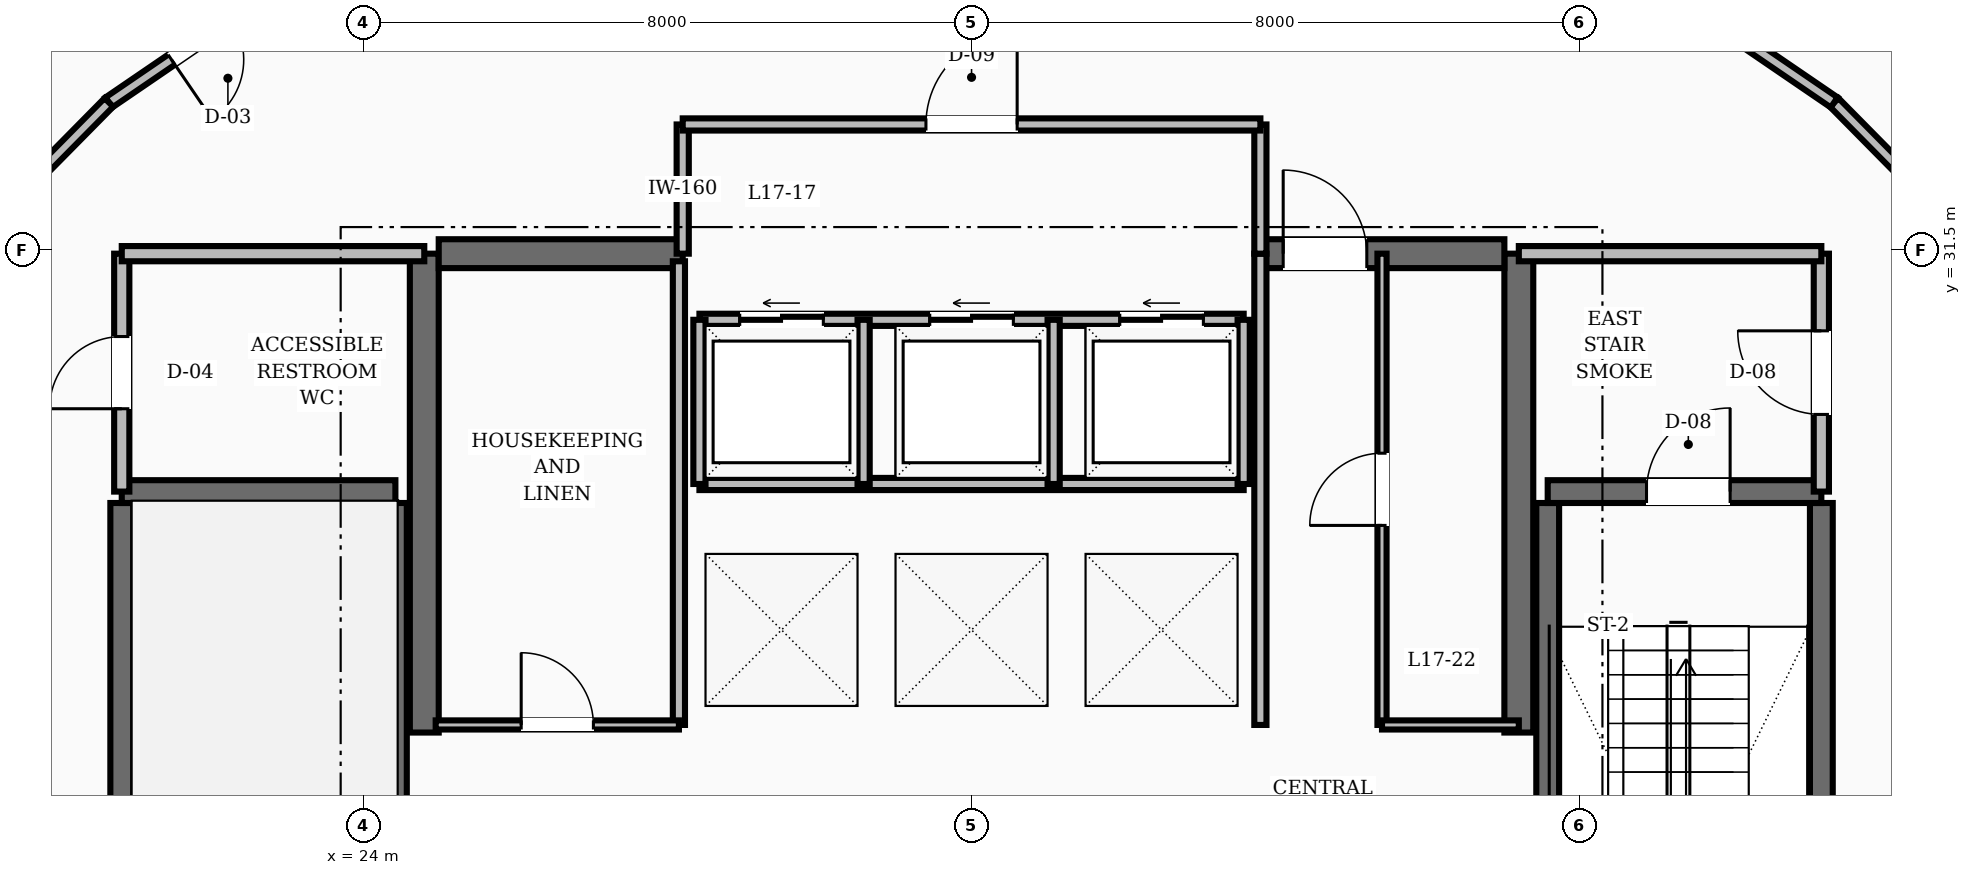
"""IFC4 building model, lengths in metres.
Left out: names, types, materials, properties, quantities, classifications, styles, units other than length and angle.
Written with IfcOpenShell. Run it as: python <this file> out.ifc"""

import sys

from ifc_helpers import new_model, si_unit, direction, frame, frame_2d, origin, place, context, subcontext, project, spatial, rectangle, extrude, element, fill, save


model = new_model("IFC4")
c1 = context("Model", 3, precision=1e-05, world=origin(), true_north=direction((0.0, 1.0)))
c2 = subcontext(c1, "Body", "Model", "MODEL_VIEW")
j1 = project(units=[si_unit("LENGTHUNIT", "METRE"), si_unit("PLANEANGLEUNIT", "RADIAN")], contexts=[c1])
p1 = place(None, origin())
s1 = spatial("IfcSite", under=j1, at=p1, CompositionType="ELEMENT")
p2 = place(p1, origin())
s2 = spatial("IfcBuilding", under=s1, at=p2, CompositionType="ELEMENT")
p3 = place(p2, frame((0.0, 0.0, 70.0)))
s3 = spatial("IfcBuildingStorey", under=s2, at=p3, CompositionType="ELEMENT", Elevation=70.0)
for number, where, z_axis, x_axis in (
    (1, (24.8, 25.15, 0.0), (0.0, 0.0, 1.0), (0.0, 1.0, 0.0)),
    (2, (39.2, 25.15, 0.0), (0.0, 0.0, 1.0), (0.0, 1.0, 0.0)),
):
    element("IfcWall", number, at=place(p3, frame(where, z_axis=z_axis, x_axis=x_axis)), inside=s3, PredefinedType="SHEAR", context=c2, shape_type="SweptSolid", body=[
        extrude(rectangle(XDim=6.3, YDim=0.38, at=frame_2d((3.15, 0.0))), origin(), (0.0, 0.0, 1.0), 3.6),
    ])
p4 = place(p3, frame((24.99, 31.45, 0.0), z_axis=(0.0, 0.0, 1.0), x_axis=(1.0, 0.0, 0.0)))
e3 = element("IfcWall", 3, at=p4, inside=s3, PredefinedType="SHEAR", context=c2, shape_type="SweptSolid", body=[
    extrude(rectangle(XDim=3.21, YDim=0.38, at=frame_2d((1.605, 0.0))), origin(), (0.0, 0.0, 1.0), 3.6),
])
p5 = place(p3, frame((35.8, 31.45, 0.0), z_axis=(0.0, 0.0, 1.0), x_axis=(1.0, 0.0, 0.0)))
e4 = element("IfcWall", 4, at=p5, inside=s3, PredefinedType="SHEAR", context=c2, shape_type="SweptSolid", body=[
    extrude(rectangle(XDim=3.21, YDim=0.38, at=frame_2d((1.605, 0.0))), origin(), (0.0, 0.0, 1.0), 3.6),
])
p6 = place(p5, frame((0.3, 0.0, 0.0)))
e5 = element("IfcOpeningElement", 5, at=p6, cuts=e4, PredefinedType="OPENING", context=c2, shape_type="SweptSolid", body=[
    extrude(rectangle(XDim=1.1, YDim=2.1, at=frame_2d((0.55, 1.05))), frame((0.0, 0.2, 0.0), z_axis=(0.0, -1.0, 0.0), x_axis=(1.0, 0.0, 0.0)), (0.0, 0.0, 1.0), 0.4),
])
for number, where, z_axis, x_axis in (
    (6, (20.82, 19.43, 0.0), (0.0, 0.0, 1.0), (0.0, 1.0, 0.0)),
    (7, (24.42, 19.43, 0.0), (0.0, 0.0, 1.0), (0.0, 1.0, 0.0)),
):
    element("IfcWall", number, at=place(p3, frame(where, z_axis=z_axis, x_axis=x_axis)), inside=s3, PredefinedType="SHEAR", context=c2, shape_type="SweptSolid", body=[
        extrude(rectangle(XDim=8.74, YDim=0.3, at=frame_2d((4.37, 0.0))), origin(), (0.0, 0.0, 1.0), 3.6),
    ])
p7 = place(p3, frame((20.82, 28.32, 0.0), z_axis=(0.0, 0.0, 1.0), x_axis=(1.0, 0.0, 0.0)))
e8 = element("IfcWall", 8, at=p7, inside=s3, PredefinedType="SHEAR", context=c2, shape_type="SweptSolid", body=[
    extrude(rectangle(XDim=3.6, YDim=0.3, at=frame_2d((1.8, 0.0))), origin(), (0.0, 0.0, 1.0), 3.6),
])
for number, where, z_axis, x_axis in (
    (9, (43.18, 19.43, 0.0), (0.0, 0.0, 1.0), (0.0, 1.0, 0.0)),
    (10, (39.58, 19.43, 0.0), (0.0, 0.0, 1.0), (0.0, 1.0, 0.0)),
):
    element("IfcWall", number, at=place(p3, frame(where, z_axis=z_axis, x_axis=x_axis)), inside=s3, PredefinedType="SHEAR", context=c2, shape_type="SweptSolid", body=[
        extrude(rectangle(XDim=8.74, YDim=0.3, at=frame_2d((4.37, 0.0))), origin(), (0.0, 0.0, 1.0), 3.6),
    ])
p8 = place(p3, frame((39.58, 28.32, 0.0), z_axis=(0.0, 0.0, 1.0), x_axis=(1.0, 0.0, 0.0)))
e11 = element("IfcWall", 11, at=p8, inside=s3, PredefinedType="SHEAR", context=c2, shape_type="SweptSolid", body=[
    extrude(rectangle(XDim=3.6, YDim=0.3, at=frame_2d((1.8, 0.0))), origin(), (0.0, 0.0, 1.0), 3.6),
])
p9 = place(p8, frame((1.3, 0.0, 0.0)))
e12 = element("IfcOpeningElement", 12, at=p9, cuts=e11, PredefinedType="OPENING", context=c2, shape_type="SweptSolid", body=[
    extrude(rectangle(XDim=1.1, YDim=2.1, at=frame_2d((0.55, 1.05))), frame((0.0, 0.16, 0.0), z_axis=(0.0, -1.0, 0.0), x_axis=(1.0, 0.0, 0.0)), (0.0, 0.0, 1.0), 0.32),
])
p10 = place(p3, frame((43.18, 28.32, 0.0), z_axis=(0.0, 0.0, 1.0), x_axis=(0.0, 1.0, 0.0)))
e13 = element("IfcWall", 13, at=p10, inside=s3, PredefinedType="SOLIDWALL", context=c2, shape_type="SweptSolid", body=[
    extrude(rectangle(XDim=3.13, YDim=0.2, at=frame_2d((1.565, 0.0))), origin(), (0.0, 0.0, 1.0), 2.71),
])
p11 = place(p10, frame((1.015, 0.0, 0.0)))
e14 = element("IfcOpeningElement", 14, at=p11, cuts=e13, PredefinedType="OPENING", context=c2, shape_type="SweptSolid", body=[
    extrude(rectangle(XDim=1.1, YDim=2.1, at=frame_2d((0.55, 1.05))), frame((0.0, 0.11, 0.0), z_axis=(0.0, -1.0, 0.0), x_axis=(1.0, 0.0, 0.0)), (0.0, 0.0, 1.0), 0.22),
])
p12 = place(p3, frame((39.2, 31.45, 0.0), z_axis=(0.0, 0.0, 1.0), x_axis=(1.0, 0.0, 0.0)))
e15 = element("IfcWall", 15, at=p12, inside=s3, PredefinedType="SOLIDWALL", context=c2, shape_type="SweptSolid", body=[
    extrude(rectangle(XDim=3.98, YDim=0.2, at=frame_2d((1.99, 0.0))), origin(), (0.0, 0.0, 1.0), 2.71),
])
p13 = place(p3, frame((20.82, 28.32, 0.0), z_axis=(0.0, 0.0, 1.0), x_axis=(0.0, 1.0, 0.0)))
e16 = element("IfcWall", 16, at=p13, inside=s3, PredefinedType="SOLIDWALL", context=c2, shape_type="SweptSolid", body=[
    extrude(rectangle(XDim=3.13, YDim=0.2, at=frame_2d((1.565, 0.0))), origin(), (0.0, 0.0, 1.0), 2.71),
])
p14 = place(p13, frame((1.09, 0.0, 0.0)))
e17 = element("IfcOpeningElement", 17, at=p14, cuts=e16, PredefinedType="OPENING", context=c2, shape_type="SweptSolid", body=[
    extrude(rectangle(XDim=0.95, YDim=2.1, at=frame_2d((0.475, 1.05))), frame((0.0, 0.11, 0.0), z_axis=(0.0, -1.0, 0.0), x_axis=(1.0, 0.0, 0.0)), (0.0, 0.0, 1.0), 0.22),
])
p15 = place(p3, frame((20.82, 31.45, 0.0), z_axis=(0.0, 0.0, 1.0), x_axis=(1.0, 0.0, 0.0)))
e18 = element("IfcWall", 18, at=p15, inside=s3, PredefinedType="SOLIDWALL", context=c2, shape_type="SweptSolid", body=[
    extrude(rectangle(XDim=3.98, YDim=0.2, at=frame_2d((1.99, 0.0))), origin(), (0.0, 0.0, 1.0), 2.71),
])
p16 = place(p3, frame((35.8, 25.25, 0.0), z_axis=(0.0, 0.0, 1.0), x_axis=(0.0, 1.0, 0.0)))
e19 = element("IfcWall", 19, at=p16, inside=s3, PredefinedType="SOLIDWALL", context=c2, shape_type="SweptSolid", body=[
    extrude(rectangle(XDim=6.2, YDim=0.16, at=frame_2d((3.1, 0.0))), origin(), (0.0, 0.0, 1.0), 2.71),
])
p17 = place(p3, frame((28.42, 30.58, 0.0), z_axis=(0.0, 0.0, 1.0), x_axis=(1.0, 0.0, 0.0)))
e20 = element("IfcWall", 20, at=p17, inside=s3, PredefinedType="SOLIDWALL", context=c2, shape_type="SweptSolid", body=[
    extrude(rectangle(XDim=7.16, YDim=0.16, at=frame_2d((3.58, 0.0))), origin(), (0.0, 0.0, 1.0), 2.71),
])
p18 = place(p17, frame((0.53, 0.0, 0.0)))
e21 = element("IfcOpeningElement", 21, at=p18, cuts=e20, PredefinedType="OPENING", context=c2, shape_type="SweptSolid", body=[
    extrude(rectangle(XDim=1.1, YDim=2.15, at=frame_2d((0.55, 1.075))), frame((0.0, 0.09, 0.0), z_axis=(0.0, -1.0, 0.0), x_axis=(1.0, 0.0, 0.0)), (0.0, 0.0, 1.0), 0.18),
])
p19 = place(p17, frame((3.03, 0.0, 0.0)))
e22 = element("IfcOpeningElement", 22, at=p19, cuts=e20, PredefinedType="OPENING", context=c2, shape_type="SweptSolid", body=[
    extrude(rectangle(XDim=1.1, YDim=2.15, at=frame_2d((0.55, 1.075))), frame((0.0, 0.09, 0.0), z_axis=(0.0, -1.0, 0.0), x_axis=(1.0, 0.0, 0.0)), (0.0, 0.0, 1.0), 0.18),
])
p20 = place(p17, frame((5.53, 0.0, 0.0)))
e23 = element("IfcOpeningElement", 23, at=p20, cuts=e20, PredefinedType="OPENING", context=c2, shape_type="SweptSolid", body=[
    extrude(rectangle(XDim=1.1, YDim=2.15, at=frame_2d((0.55, 1.075))), frame((0.0, 0.09, 0.0), z_axis=(0.0, -1.0, 0.0), x_axis=(1.0, 0.0, 0.0)), (0.0, 0.0, 1.0), 0.18),
])
p21 = place(p3, frame((28.42, 28.42, 0.0), z_axis=(0.0, 0.0, 1.0), x_axis=(1.0, 0.0, 0.0)))
e24 = element("IfcWall", 24, at=p21, inside=s3, PredefinedType="SOLIDWALL", context=c2, shape_type="SweptSolid", body=[
    extrude(rectangle(XDim=7.16, YDim=0.16, at=frame_2d((3.58, 0.0))), origin(), (0.0, 0.0, 1.0), 2.71),
])
for number, where, z_axis, x_axis in (
    (25, (28.42, 28.42, 0.0), (0.0, 0.0, 1.0), (0.0, 1.0, 0.0)),
    (26, (30.58, 28.42, 0.0), (0.0, 0.0, 1.0), (0.0, 1.0, 0.0)),
    (27, (33.08, 28.42, 0.0), (0.0, 0.0, 1.0), (0.0, 1.0, 0.0)),
    (28, (35.58, 28.42, 0.0), (0.0, 0.0, 1.0), (0.0, 1.0, 0.0)),
):
    element("IfcWall", number, at=place(p3, frame(where, z_axis=z_axis, x_axis=x_axis)), inside=s3, PredefinedType="SOLIDWALL", context=c2, shape_type="SweptSolid", body=[
        extrude(rectangle(XDim=2.16, YDim=0.16, at=frame_2d((1.08, 0.0))), origin(), (0.0, 0.0, 1.0), 2.71),
    ])
for number, where, z_axis, x_axis in (
    (29, (28.2, 31.45, 0.0), (0.0, 0.0, 1.0), (0.0, 1.0, 0.0)),
    (30, (35.8, 31.45, 0.0), (0.0, 0.0, 1.0), (0.0, 1.0, 0.0)),
):
    element("IfcWall", number, at=place(p3, frame(where, z_axis=z_axis, x_axis=x_axis)), inside=s3, PredefinedType="SOLIDWALL", context=c2, shape_type="SweptSolid", body=[
        extrude(rectangle(XDim=1.7, YDim=0.16, at=frame_2d((0.85, 0.0))), origin(), (0.0, 0.0, 1.0), 2.71),
    ])
p22 = place(p3, frame((28.2, 33.15, 0.0), z_axis=(0.0, 0.0, 1.0), x_axis=(1.0, 0.0, 0.0)))
e31 = element("IfcWall", 31, at=p22, inside=s3, PredefinedType="SOLIDWALL", context=c2, shape_type="SweptSolid", body=[
    extrude(rectangle(XDim=7.6, YDim=0.16, at=frame_2d((3.8, 0.0))), origin(), (0.0, 0.0, 1.0), 2.71),
])
p23 = place(p22, frame((3.2, 0.0, 0.0)))
e32 = element("IfcOpeningElement", 32, at=p23, cuts=e31, PredefinedType="OPENING", context=c2, shape_type="SweptSolid", body=[
    extrude(rectangle(XDim=1.2, YDim=2.1, at=frame_2d((0.6, 1.05))), frame((0.0, 0.09, 0.0), z_axis=(0.0, -1.0, 0.0), x_axis=(1.0, 0.0, 0.0)), (0.0, 0.0, 1.0), 0.18),
])
p24 = place(p3, frame((28.15, 25.25, 0.0), z_axis=(0.0, 0.0, 1.0), x_axis=(0.0, 1.0, 0.0)))
e33 = element("IfcWall", 33, at=p24, inside=s3, PredefinedType="SOLIDWALL", context=c2, shape_type="SweptSolid", body=[
    extrude(rectangle(XDim=6.1, YDim=0.16, at=frame_2d((3.05, 0.0))), origin(), (0.0, 0.0, 1.0), 2.71),
])
p25 = place(p3, frame((24.95, 25.25, 0.0), z_axis=(0.0, 0.0, 1.0), x_axis=(1.0, 0.0, 0.0)))
e34 = element("IfcWall", 34, at=p25, inside=s3, PredefinedType="PARTITIONING", context=c2, shape_type="SweptSolid", body=[
    extrude(rectangle(XDim=3.2, YDim=0.12, at=frame_2d((1.6, 0.0))), origin(), (0.0, 0.0, 1.0), 2.71),
])
p26 = place(p25, frame((1.125, 0.0, 0.0)))
e35 = element("IfcOpeningElement", 35, at=p26, cuts=e34, PredefinedType="OPENING", context=c2, shape_type="SweptSolid", body=[
    extrude(rectangle(XDim=0.95, YDim=2.1, at=frame_2d((0.475, 1.05))), frame((0.0, 0.07, 0.0), z_axis=(0.0, -1.0, 0.0), x_axis=(1.0, 0.0, 0.0)), (0.0, 0.0, 1.0), 0.14),
])
p27 = place(p3, frame((37.4, 25.25, 0.0), z_axis=(0.0, 0.0, 1.0), x_axis=(0.0, 1.0, 0.0)))
e36 = element("IfcWall", 36, at=p27, inside=s3, PredefinedType="PARTITIONING", context=c2, shape_type="SweptSolid", body=[
    extrude(rectangle(XDim=6.2, YDim=0.12, at=frame_2d((3.1, 0.0))), origin(), (0.0, 0.0, 1.0), 2.71),
])
p28 = place(p27, frame((2.625, 0.0, 0.0)))
e37 = element("IfcOpeningElement", 37, at=p28, cuts=e36, PredefinedType="OPENING", context=c2, shape_type="SweptSolid", body=[
    extrude(rectangle(XDim=0.95, YDim=2.1, at=frame_2d((0.475, 1.05))), frame((0.0, 0.07, 0.0), z_axis=(0.0, -1.0, 0.0), x_axis=(1.0, 0.0, 0.0)), (0.0, 0.0, 1.0), 0.14),
])
p29 = place(p3, frame((37.4, 25.25, 0.0), z_axis=(0.0, 0.0, 1.0), x_axis=(1.0, 0.0, 0.0)))
e38 = element("IfcWall", 38, at=p29, inside=s3, PredefinedType="PARTITIONING", context=c2, shape_type="SweptSolid", body=[
    extrude(rectangle(XDim=1.8, YDim=0.12, at=frame_2d((0.9, 0.0))), origin(), (0.0, 0.0, 1.0), 2.71),
])
p30 = place(p3, frame((45.345, 31.417, 0.0), z_axis=(0.0, 0.0, 1.0), x_axis=(-0.702366174226, 0.711815816981, 0.0)))
e39 = element("IfcWall", 39, at=p30, inside=s3, PredefinedType="SOLIDWALL", context=c2, shape_type="SweptSolid", body=[
    extrude(rectangle(XDim=2.842, YDim=0.16, at=frame_2d((1.421, 0.0))), origin(), (0.0, 0.0, 1.0), 2.71),
])
p31 = place(p3, frame((43.349, 33.44, 0.0), z_axis=(0.0, 0.0, 1.0), x_axis=(-0.825929039072, 0.563774088104, 0.0)))
e40 = element("IfcWall", 40, at=p31, inside=s3, PredefinedType="SOLIDWALL", context=c2, shape_type="SweptSolid", body=[
    extrude(rectangle(XDim=2.945, YDim=0.16, at=frame_2d((1.472, 0.0))), origin(), (0.0, 0.0, 1.0), 2.71),
])
p32 = place(p3, frame((23.083, 35.1, 0.0), z_axis=(0.0, 0.0, 1.0), x_axis=(-0.825929039072, -0.563774088104, 0.0)))
e41 = element("IfcWall", 41, at=p32, inside=s3, PredefinedType="SOLIDWALL", context=c2, shape_type="SweptSolid", body=[
    extrude(rectangle(XDim=2.945, YDim=0.16, at=frame_2d((1.472, 0.0))), origin(), (0.0, 0.0, 1.0), 2.71),
])
p33 = place(p32, frame((0.997, 0.0, 0.0)))
e42 = element("IfcOpeningElement", 42, at=p33, cuts=e41, PredefinedType="OPENING", context=c2, shape_type="SweptSolid", body=[
    extrude(rectangle(XDim=0.95, YDim=2.1, at=frame_2d((0.475, 1.05))), frame((0.0, 0.09, 0.0), z_axis=(0.0, -1.0, 0.0), x_axis=(1.0, 0.0, 0.0)), (0.0, 0.0, 1.0), 0.18),
])
p34 = place(p3, frame((20.651, 33.44, 0.0), z_axis=(0.0, 0.0, 1.0), x_axis=(-0.702366174226, -0.711815816981, 0.0)))
e43 = element("IfcWall", 43, at=p34, inside=s3, PredefinedType="SOLIDWALL", context=c2, shape_type="SweptSolid", body=[
    extrude(rectangle(XDim=2.842, YDim=0.16, at=frame_2d((1.421, 0.0))), origin(), (0.0, 0.0, 1.0), 2.71),
])
p35 = place(p9, origin())
e44 = element("IfcDoor", 44, at=p35, inside=s3, OperationType="SINGLE_SWING_RIGHT", PredefinedType="DOOR", context=c2, shape_type="SweptSolid", body=[
    extrude(rectangle(XDim=1.1, YDim=2.1, at=frame_2d((0.55, 1.05))), frame((0.0, 0.025, 0.0), z_axis=(0.0, -1.0, 0.0), x_axis=(1.0, 0.0, 0.0)), (0.0, 0.0, 1.0), 0.05),
])
fill(e12, e44)
p36 = place(p11, origin())
e45 = element("IfcDoor", 45, at=p36, inside=s3, OperationType="SINGLE_SWING_RIGHT", PredefinedType="DOOR", context=c2, shape_type="SweptSolid", body=[
    extrude(rectangle(XDim=1.1, YDim=2.1, at=frame_2d((0.55, 1.05))), frame((0.0, 0.025, 0.0), z_axis=(0.0, -1.0, 0.0), x_axis=(1.0, 0.0, 0.0)), (0.0, 0.0, 1.0), 0.05),
])
fill(e14, e45)
p37 = place(p14, origin())
e46 = element("IfcDoor", 46, at=p37, inside=s3, OperationType="SINGLE_SWING_LEFT", PredefinedType="DOOR", context=c2, shape_type="SweptSolid", body=[
    extrude(rectangle(XDim=0.95, YDim=2.1, at=frame_2d((0.475, 1.05))), frame((0.0, 0.025, 0.0), z_axis=(0.0, -1.0, 0.0), x_axis=(1.0, 0.0, 0.0)), (0.0, 0.0, 1.0), 0.05),
])
fill(e17, e46)
p38 = place(p6, origin())
e47 = element("IfcDoor", 47, at=p38, inside=s3, OperationType="SINGLE_SWING_LEFT", PredefinedType="DOOR", context=c2, shape_type="SweptSolid", body=[
    extrude(rectangle(XDim=1.1, YDim=2.1, at=frame_2d((0.55, 1.05))), frame((0.0, 0.025, 0.0), z_axis=(0.0, -1.0, 0.0), x_axis=(1.0, 0.0, 0.0)), (0.0, 0.0, 1.0), 0.05),
])
fill(e5, e47)
p39 = place(p18, origin())
e48 = element("IfcDoor", 48, at=p39, inside=s3, OperationType="SLIDING_TO_LEFT", PredefinedType="DOOR", context=c2, shape_type="SweptSolid", body=[
    extrude(rectangle(XDim=1.1, YDim=2.15, at=frame_2d((0.55, 1.075))), frame((0.0, 0.025, 0.0), z_axis=(0.0, -1.0, 0.0), x_axis=(1.0, 0.0, 0.0)), (0.0, 0.0, 1.0), 0.05),
])
fill(e21, e48)
p40 = place(p19, origin())
e49 = element("IfcDoor", 49, at=p40, inside=s3, OperationType="SLIDING_TO_LEFT", PredefinedType="DOOR", context=c2, shape_type="SweptSolid", body=[
    extrude(rectangle(XDim=1.1, YDim=2.15, at=frame_2d((0.55, 1.075))), frame((0.0, 0.025, 0.0), z_axis=(0.0, -1.0, 0.0), x_axis=(1.0, 0.0, 0.0)), (0.0, 0.0, 1.0), 0.05),
])
fill(e22, e49)
p41 = place(p20, origin())
e50 = element("IfcDoor", 50, at=p41, inside=s3, OperationType="SLIDING_TO_LEFT", PredefinedType="DOOR", context=c2, shape_type="SweptSolid", body=[
    extrude(rectangle(XDim=1.1, YDim=2.15, at=frame_2d((0.55, 1.075))), frame((0.0, 0.025, 0.0), z_axis=(0.0, -1.0, 0.0), x_axis=(1.0, 0.0, 0.0)), (0.0, 0.0, 1.0), 0.05),
])
fill(e23, e50)
p42 = place(p23, origin())
e51 = element("IfcDoor", 51, at=p42, inside=s3, OperationType="SINGLE_SWING_RIGHT", PredefinedType="DOOR", context=c2, shape_type="SweptSolid", body=[
    extrude(rectangle(XDim=1.2, YDim=2.1, at=frame_2d((0.6, 1.05))), frame((0.0, 0.025, 0.0), z_axis=(0.0, -1.0, 0.0), x_axis=(1.0, 0.0, 0.0)), (0.0, 0.0, 1.0), 0.05),
])
fill(e32, e51)
p43 = place(p26, origin())
e52 = element("IfcDoor", 52, at=p43, inside=s3, OperationType="SINGLE_SWING_LEFT", PredefinedType="DOOR", context=c2, shape_type="SweptSolid", body=[
    extrude(rectangle(XDim=0.95, YDim=2.1, at=frame_2d((0.475, 1.05))), frame((0.0, 0.025, 0.0), z_axis=(0.0, -1.0, 0.0), x_axis=(1.0, 0.0, 0.0)), (0.0, 0.0, 1.0), 0.05),
])
fill(e35, e52)
p44 = place(p28, origin())
e53 = element("IfcDoor", 53, at=p44, inside=s3, OperationType="SINGLE_SWING_LEFT", PredefinedType="DOOR", context=c2, shape_type="SweptSolid", body=[
    extrude(rectangle(XDim=0.95, YDim=2.1, at=frame_2d((0.475, 1.05))), frame((0.0, 0.025, 0.0), z_axis=(0.0, -1.0, 0.0), x_axis=(1.0, 0.0, 0.0)), (0.0, 0.0, 1.0), 0.05),
])
fill(e37, e53)
p45 = place(p33, origin())
e54 = element("IfcDoor", 54, at=p45, inside=s3, OperationType="SINGLE_SWING_RIGHT", PredefinedType="DOOR", context=c2, shape_type="SweptSolid", body=[
    extrude(rectangle(XDim=0.95, YDim=2.1, at=frame_2d((0.475, 1.05))), frame((0.0, 0.025, 0.0), z_axis=(0.0, -1.0, 0.0), x_axis=(1.0, 0.0, 0.0)), (0.0, 0.0, 1.0), 0.05),
])
fill(e42, e54)
save(model, sys.argv[1])
